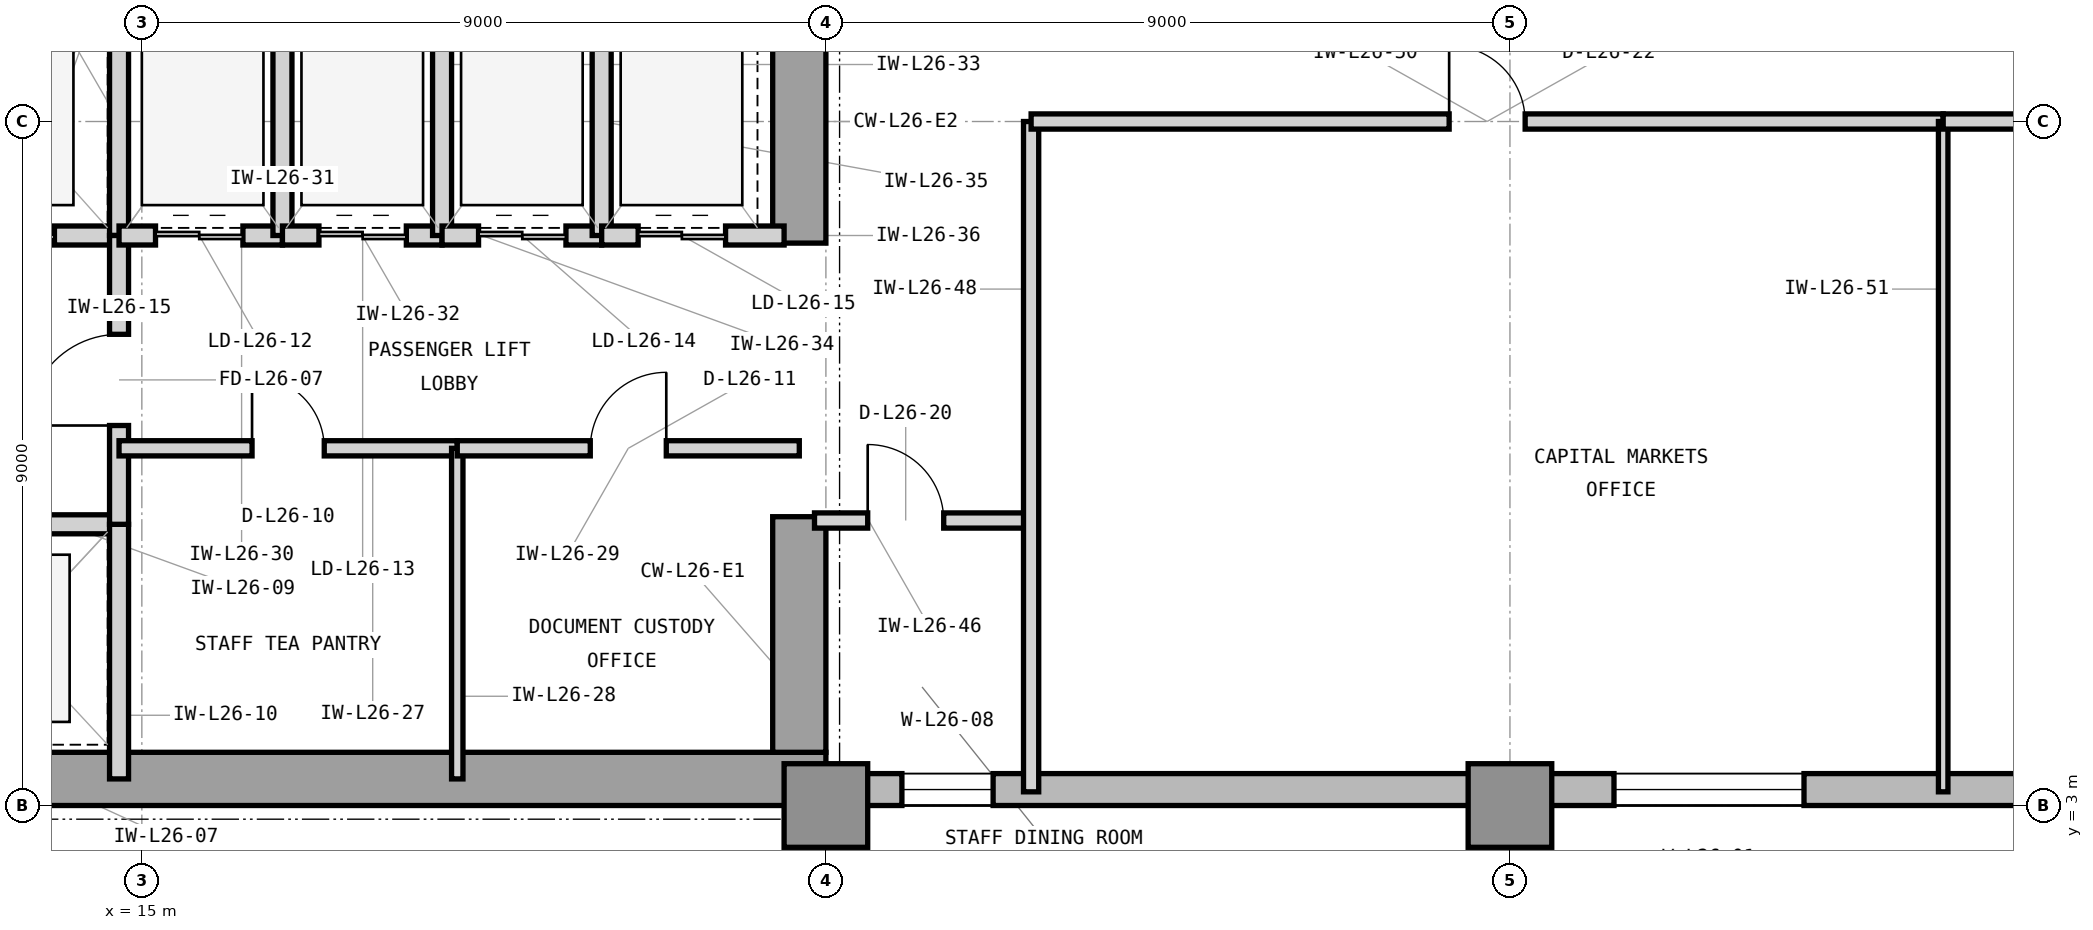
"""IFC4 building model, lengths in metres.
Left out: names, types, materials, properties, quantities, classifications, styles, units other than length and angle.
Written with IfcOpenShell. Run it as: python <this file> out.ifc"""

import sys

from ifc_helpers import new_model, si_unit, direction, frame, frame_2d, origin, origin_2d, place, context, subcontext, project, spatial, rectangle, extrude, element, fill, save


model = new_model("IFC4")
c1 = context("Model", 3, precision=1e-05, world=origin(), true_north=direction((0.0, 1.0)))
c2 = subcontext(c1, "Body", "Model", "MODEL_VIEW")
j1 = project(units=[si_unit("LENGTHUNIT", "METRE"), si_unit("PLANEANGLEUNIT", "RADIAN")], contexts=[c1])
p1 = place(None, origin())
s1 = spatial("IfcSite", under=j1, at=p1, CompositionType="ELEMENT")
p2 = place(p1, origin())
s2 = spatial("IfcBuilding", under=s1, at=p2, CompositionType="ELEMENT")
p3 = place(p2, frame((0.0, 0.0, 112.8)))
s3 = spatial("IfcBuildingStorey", under=s2, at=p3, CompositionType="ELEMENT", Elevation=112.8)
p4 = place(p3, frame((7.475, 3.35, 0.0), z_axis=(0.0, 0.0, 1.0), x_axis=(1.0, 0.0, 0.0)))
e1 = element("IfcWall", 1, at=p4, inside=s3, PredefinedType="SHEAR", context=c2, shape_type="SweptSolid", body=[
    extrude(rectangle(XDim=16.525, YDim=0.7, at=frame_2d((8.262, 0.0))), origin(), (0.0, 0.0, 1.0), 3.9),
])
p5 = place(p3, frame((23.65, 3.7, 0.0), z_axis=(0.0, 0.0, 1.0), x_axis=(0.0, 1.0, 0.0)))
e2 = element("IfcWall", 2, at=p5, inside=s3, PredefinedType="SHEAR", context=c2, shape_type="SweptSolid", body=[
    extrude(rectangle(XDim=3.1, YDim=0.7, at=frame_2d((1.55, 0.0))), origin(), (0.0, 0.0, 1.0), 3.9),
])
p6 = place(p3, frame((23.65, 10.4, 0.0), z_axis=(0.0, 0.0, 1.0), x_axis=(0.0, 1.0, 0.0)))
e3 = element("IfcWall", 3, at=p6, inside=s3, PredefinedType="SHEAR", context=c2, shape_type="SweptSolid", body=[
    extrude(rectangle(XDim=3.2, YDim=0.7, at=frame_2d((1.6, 0.0))), origin(), (0.0, 0.0, 1.0), 3.9),
])
for number, where, z_axis, x_axis in (
    (4, (24.0, 3.0, 0.0), (0.0, 0.0, 1.0), (1.0, 0.0, 0.0)),
    (5, (33.0, 3.0, 0.0), (0.0, 0.0, 1.0), (1.0, 0.0, 0.0)),
):
    element("IfcColumn", number, at=place(p3, frame(where, z_axis=z_axis, x_axis=x_axis)), inside=s3, PredefinedType="COLUMN", context=c2, shape_type="SweptSolid", body=[
        extrude(rectangle(XDim=1.1, YDim=1.1, at=origin_2d()), origin(), (0.0, 0.0, 1.0), 3.9),
    ])
p7 = place(p3, frame((23.9, 3.21, 0.0), z_axis=(0.0, 0.0, 1.0), x_axis=(1.0, 0.0, 0.0)))
e6 = element("IfcWall", 6, at=p7, inside=s3, PredefinedType="STANDARD", context=c2, shape_type="SweptSolid", body=[
    extrude(rectangle(XDim=37.5, YDim=0.42, at=frame_2d((18.75, 0.0))), origin(), (0.0, 0.0, 1.0), 3.7),
])
p8 = place(p7, frame((10.469, 0.0, 0.85)))
e7 = element("IfcOpeningElement", 7, at=p8, cuts=e6, PredefinedType="OPENING", context=c2, shape_type="SweptSolid", body=[
    extrude(rectangle(XDim=2.5, YDim=2.25, at=frame_2d((1.25, 1.125))), frame((0.0, 0.22, 0.0), z_axis=(0.0, -1.0, 0.0), x_axis=(1.0, 0.0, 0.0)), (0.0, 0.0, 1.0), 0.44),
])
p9 = place(p7, frame((19.844, 0.0, 0.85)))
e8 = element("IfcOpeningElement", 8, at=p9, cuts=e6, PredefinedType="OPENING", context=c2, shape_type="SweptSolid", body=[
    extrude(rectangle(XDim=2.5, YDim=2.25, at=frame_2d((1.25, 1.125))), frame((0.0, 0.22, 0.0), z_axis=(0.0, -1.0, 0.0), x_axis=(1.0, 0.0, 0.0)), (0.0, 0.0, 1.0), 0.44),
])
p10 = place(p7, frame((1.1, 0.0, 0.85)))
e9 = element("IfcOpeningElement", 9, at=p10, cuts=e6, PredefinedType="OPENING", context=c2, shape_type="SweptSolid", body=[
    extrude(rectangle(XDim=1.2, YDim=2.25, at=frame_2d((0.6, 1.125))), frame((0.0, 0.22, 0.0), z_axis=(0.0, -1.0, 0.0), x_axis=(1.0, 0.0, 0.0)), (0.0, 0.0, 1.0), 0.44),
])
p11 = place(p7, frame((28.036, 0.0, 0.85)))
e10 = element("IfcOpeningElement", 10, at=p11, cuts=e6, PredefinedType="OPENING", context=c2, shape_type="SweptSolid", body=[
    extrude(rectangle(XDim=1.2, YDim=2.25, at=frame_2d((0.6, 1.125))), frame((0.0, 0.22, 0.0), z_axis=(0.0, -1.0, 0.0), x_axis=(1.0, 0.0, 0.0)), (0.0, 0.0, 1.0), 0.44),
])
p12 = place(p3, frame((11.82, 6.7, 0.0), z_axis=(0.0, 0.0, 1.0), x_axis=(1.0, 0.0, 0.0)))
e11 = element("IfcWall", 11, at=p12, inside=s3, PredefinedType="PARTITIONING", context=c2, shape_type="SweptSolid", body=[
    extrude(rectangle(XDim=2.88, YDim=0.25, at=frame_2d((1.44, 0.0))), origin(), (0.0, 0.0, 1.0), 3.227),
])
p13 = place(p12, frame((0.85, 0.0, 0.0)))
e12 = element("IfcOpeningElement", 12, at=p13, cuts=e11, PredefinedType="OPENING", context=c2, shape_type="SweptSolid", body=[
    extrude(rectangle(XDim=1.1, YDim=2.25, at=frame_2d((0.55, 1.125))), frame((0.0, 0.135, 0.0), z_axis=(0.0, -1.0, 0.0), x_axis=(1.0, 0.0, 0.0)), (0.0, 0.0, 1.0), 0.27),
])
p14 = place(p3, frame((14.7, 3.35, 0.0), z_axis=(0.0, 0.0, 1.0), x_axis=(0.0, 1.0, 0.0)))
e13 = element("IfcWall", 13, at=p14, inside=s3, PredefinedType="PARTITIONING", context=c2, shape_type="SweptSolid", body=[
    extrude(rectangle(XDim=3.35, YDim=0.25, at=frame_2d((1.675, 0.0))), origin(), (0.0, 0.0, 1.0), 3.69),
])
p15 = place(p3, frame((11.95, 10.5, 0.0), z_axis=(0.0, 0.0, 1.0), x_axis=(1.0, 0.0, 0.0)))
e14 = element("IfcWall", 14, at=p15, inside=s3, PredefinedType="PARTITIONING", context=c2, shape_type="SweptSolid", body=[
    extrude(rectangle(XDim=2.75, YDim=0.25, at=frame_2d((1.375, 0.0))), origin(), (0.0, 0.0, 1.0), 3.227),
])
p16 = place(p15, frame((0.8, 0.0, 0.0)))
e15 = element("IfcOpeningElement", 15, at=p16, cuts=e14, PredefinedType="OPENING", context=c2, shape_type="SweptSolid", body=[
    extrude(rectangle(XDim=1.1, YDim=2.25, at=frame_2d((0.55, 1.125))), frame((0.0, 0.135, 0.0), z_axis=(0.0, -1.0, 0.0), x_axis=(1.0, 0.0, 0.0)), (0.0, 0.0, 1.0), 0.27),
])
p17 = place(p3, frame((14.7, 10.5, 0.0), z_axis=(0.0, 0.0, 1.0), x_axis=(0.0, 1.0, 0.0)))
e16 = element("IfcWall", 16, at=p17, inside=s3, PredefinedType="PARTITIONING", context=c2, shape_type="SweptSolid", body=[
    extrude(rectangle(XDim=3.0, YDim=0.25, at=frame_2d((1.5, 0.0))), origin(), (0.0, 0.0, 1.0), 3.69),
])
p18 = place(p3, frame((14.7, 6.7, 0.0), z_axis=(0.0, 0.0, 1.0), x_axis=(0.0, 1.0, 0.0)))
e17 = element("IfcWall", 17, at=p18, inside=s3, PredefinedType="PARTITIONING", context=c2, shape_type="SweptSolid", body=[
    extrude(rectangle(XDim=3.8, YDim=0.25, at=frame_2d((1.9, 0.0))), origin(), (0.0, 0.0, 1.0), 3.69),
])
p19 = place(p18, frame((1.3, 0.0, 0.0)))
e18 = element("IfcOpeningElement", 18, at=p19, cuts=e17, PredefinedType="OPENING", context=c2, shape_type="SweptSolid", body=[
    extrude(rectangle(XDim=1.2, YDim=2.2, at=frame_2d((0.6, 1.1))), frame((0.0, 0.135, 0.0), z_axis=(0.0, -1.0, 0.0), x_axis=(1.0, 0.0, 0.0)), (0.0, 0.0, 1.0), 0.27),
])
p20 = place(p3, frame((14.7, 7.7, 0.0), z_axis=(0.0, 0.0, 1.0), x_axis=(1.0, 0.0, 0.0)))
e19 = element("IfcWall", 19, at=p20, inside=s3, PredefinedType="PARTITIONING", context=c2, shape_type="SweptSolid", body=[
    extrude(rectangle(XDim=4.45, YDim=0.2, at=frame_2d((2.225, 0.0))), origin(), (0.0, 0.0, 1.0), 3.69),
])
p21 = place(p20, frame((1.75, 0.0, 0.0)))
e20 = element("IfcOpeningElement", 20, at=p21, cuts=e19, PredefinedType="OPENING", context=c2, shape_type="SweptSolid", body=[
    extrude(rectangle(XDim=0.95, YDim=2.1, at=frame_2d((0.475, 1.05))), frame((0.0, 0.11, 0.0), z_axis=(0.0, -1.0, 0.0), x_axis=(1.0, 0.0, 0.0)), (0.0, 0.0, 1.0), 0.22),
])
p22 = place(p3, frame((19.15, 3.35, 0.0), z_axis=(0.0, 0.0, 1.0), x_axis=(0.0, 1.0, 0.0)))
e21 = element("IfcWall", 21, at=p22, inside=s3, PredefinedType="PARTITIONING", context=c2, shape_type="SweptSolid", body=[
    extrude(rectangle(XDim=4.35, YDim=0.15, at=frame_2d((2.175, 0.0))), origin(), (0.0, 0.0, 1.0), 3.69),
])
p23 = place(p3, frame((19.15, 7.7, 0.0), z_axis=(0.0, 0.0, 1.0), x_axis=(1.0, 0.0, 0.0)))
e22 = element("IfcWall", 22, at=p23, inside=s3, PredefinedType="PARTITIONING", context=c2, shape_type="SweptSolid", body=[
    extrude(rectangle(XDim=4.5, YDim=0.2, at=frame_2d((2.25, 0.0))), origin(), (0.0, 0.0, 1.0), 3.69),
])
p24 = place(p23, frame((1.75, 0.0, 0.0)))
e23 = element("IfcOpeningElement", 23, at=p24, cuts=e22, PredefinedType="OPENING", context=c2, shape_type="SweptSolid", body=[
    extrude(rectangle(XDim=1.0, YDim=2.15, at=frame_2d((0.5, 1.075))), frame((0.0, 0.11, 0.0), z_axis=(0.0, -1.0, 0.0), x_axis=(1.0, 0.0, 0.0)), (0.0, 0.0, 1.0), 0.22),
])
p25 = place(p3, frame((14.7, 10.5, 0.0), z_axis=(0.0, 0.0, 1.0), x_axis=(1.0, 0.0, 0.0)))
e24 = element("IfcWall", 24, at=p25, inside=s3, PredefinedType="PARTITIONING", context=c2, shape_type="SweptSolid", body=[
    extrude(rectangle(XDim=2.15, YDim=0.25, at=frame_2d((1.075, 0.0))), origin(), (0.0, 0.0, 1.0), 3.227),
])
p26 = place(p25, frame((0.48, 0.0, 0.0)))
e25 = element("IfcOpeningElement", 25, at=p26, cuts=e24, PredefinedType="OPENING", context=c2, shape_type="SweptSolid", body=[
    extrude(rectangle(XDim=1.15, YDim=2.25, at=frame_2d((0.575, 1.125))), frame((0.0, 0.135, 0.0), z_axis=(0.0, -1.0, 0.0), x_axis=(1.0, 0.0, 0.0)), (0.0, 0.0, 1.0), 0.27),
])
p27 = place(p3, frame((16.85, 10.5, 0.0), z_axis=(0.0, 0.0, 1.0), x_axis=(0.0, 1.0, 0.0)))
e26 = element("IfcWall", 26, at=p27, inside=s3, PredefinedType="PARTITIONING", context=c2, shape_type="SweptSolid", body=[
    extrude(rectangle(XDim=3.0, YDim=0.25, at=frame_2d((1.5, 0.0))), origin(), (0.0, 0.0, 1.0), 3.69),
])
p28 = place(p3, frame((16.85, 10.5, 0.0), z_axis=(0.0, 0.0, 1.0), x_axis=(1.0, 0.0, 0.0)))
e27 = element("IfcWall", 27, at=p28, inside=s3, PredefinedType="PARTITIONING", context=c2, shape_type="SweptSolid", body=[
    extrude(rectangle(XDim=2.1, YDim=0.25, at=frame_2d((1.05, 0.0))), origin(), (0.0, 0.0, 1.0), 3.227),
])
p29 = place(p28, frame((0.48, 0.0, 0.0)))
e28 = element("IfcOpeningElement", 28, at=p29, cuts=e27, PredefinedType="OPENING", context=c2, shape_type="SweptSolid", body=[
    extrude(rectangle(XDim=1.15, YDim=2.25, at=frame_2d((0.575, 1.125))), frame((0.0, 0.135, 0.0), z_axis=(0.0, -1.0, 0.0), x_axis=(1.0, 0.0, 0.0)), (0.0, 0.0, 1.0), 0.27),
])
p30 = place(p3, frame((18.95, 10.5, 0.0), z_axis=(0.0, 0.0, 1.0), x_axis=(0.0, 1.0, 0.0)))
e29 = element("IfcWall", 29, at=p30, inside=s3, PredefinedType="PARTITIONING", context=c2, shape_type="SweptSolid", body=[
    extrude(rectangle(XDim=3.0, YDim=0.25, at=frame_2d((1.5, 0.0))), origin(), (0.0, 0.0, 1.0), 3.69),
])
p31 = place(p3, frame((18.95, 10.5, 0.0), z_axis=(0.0, 0.0, 1.0), x_axis=(1.0, 0.0, 0.0)))
e30 = element("IfcWall", 30, at=p31, inside=s3, PredefinedType="PARTITIONING", context=c2, shape_type="SweptSolid", body=[
    extrude(rectangle(XDim=2.1, YDim=0.25, at=frame_2d((1.05, 0.0))), origin(), (0.0, 0.0, 1.0), 3.227),
])
p32 = place(p31, frame((0.48, 0.0, 0.0)))
e31 = element("IfcOpeningElement", 31, at=p32, cuts=e30, PredefinedType="OPENING", context=c2, shape_type="SweptSolid", body=[
    extrude(rectangle(XDim=1.15, YDim=2.25, at=frame_2d((0.575, 1.125))), frame((0.0, 0.135, 0.0), z_axis=(0.0, -1.0, 0.0), x_axis=(1.0, 0.0, 0.0)), (0.0, 0.0, 1.0), 0.27),
])
p33 = place(p3, frame((21.05, 10.5, 0.0), z_axis=(0.0, 0.0, 1.0), x_axis=(0.0, 1.0, 0.0)))
e32 = element("IfcWall", 32, at=p33, inside=s3, PredefinedType="PARTITIONING", context=c2, shape_type="SweptSolid", body=[
    extrude(rectangle(XDim=3.0, YDim=0.25, at=frame_2d((1.5, 0.0))), origin(), (0.0, 0.0, 1.0), 3.69),
])
p34 = place(p3, frame((21.05, 10.5, 0.0), z_axis=(0.0, 0.0, 1.0), x_axis=(1.0, 0.0, 0.0)))
e33 = element("IfcWall", 33, at=p34, inside=s3, PredefinedType="PARTITIONING", context=c2, shape_type="SweptSolid", body=[
    extrude(rectangle(XDim=2.4, YDim=0.25, at=frame_2d((1.2, 0.0))), origin(), (0.0, 0.0, 1.0), 3.227),
])
p35 = place(p34, frame((0.48, 0.0, 0.0)))
e34 = element("IfcOpeningElement", 34, at=p35, cuts=e33, PredefinedType="OPENING", context=c2, shape_type="SweptSolid", body=[
    extrude(rectangle(XDim=1.15, YDim=2.25, at=frame_2d((0.575, 1.125))), frame((0.0, 0.135, 0.0), z_axis=(0.0, -1.0, 0.0), x_axis=(1.0, 0.0, 0.0)), (0.0, 0.0, 1.0), 0.27),
])
p36 = place(p3, frame((23.85, 6.75, 0.0), z_axis=(0.0, 0.0, 1.0), x_axis=(1.0, 0.0, 0.0)))
e35 = element("IfcWall", 35, at=p36, inside=s3, PredefinedType="PARTITIONING", context=c2, shape_type="SweptSolid", body=[
    extrude(rectangle(XDim=2.85, YDim=0.2, at=frame_2d((1.425, 0.0))), origin(), (0.0, 0.0, 1.0), 3.69),
])
p37 = place(p36, frame((0.7, 0.0, 0.0)))
e36 = element("IfcOpeningElement", 36, at=p37, cuts=e35, PredefinedType="OPENING", context=c2, shape_type="SweptSolid", body=[
    extrude(rectangle(XDim=1.0, YDim=2.15, at=frame_2d((0.5, 1.075))), frame((0.0, 0.11, 0.0), z_axis=(0.0, -1.0, 0.0), x_axis=(1.0, 0.0, 0.0)), (0.0, 0.0, 1.0), 0.22),
])
p38 = place(p3, frame((26.7, 3.18, 0.0), z_axis=(0.0, 0.0, 1.0), x_axis=(0.0, 1.0, 0.0)))
e37 = element("IfcWall", 37, at=p38, inside=s3, PredefinedType="PARTITIONING", context=c2, shape_type="SweptSolid", body=[
    extrude(rectangle(XDim=8.82, YDim=0.2, at=frame_2d((4.41, 0.0))), origin(), (0.0, 0.0, 1.0), 3.69),
])
p39 = place(p3, frame((26.7, 12.0, 0.0), z_axis=(0.0, 0.0, 1.0), x_axis=(1.0, 0.0, 0.0)))
e38 = element("IfcWall", 38, at=p39, inside=s3, PredefinedType="PARTITIONING", context=c2, shape_type="SweptSolid", body=[
    extrude(rectangle(XDim=12.0, YDim=0.2, at=frame_2d((6.0, 0.0))), origin(), (0.0, 0.0, 1.0), 3.227),
])
p40 = place(p39, frame((5.5, 0.0, 0.0)))
e39 = element("IfcOpeningElement", 39, at=p40, cuts=e38, PredefinedType="OPENING", context=c2, shape_type="SweptSolid", body=[
    extrude(rectangle(XDim=1.0, YDim=2.15, at=frame_2d((0.5, 1.075))), frame((0.0, 0.11, 0.0), z_axis=(0.0, -1.0, 0.0), x_axis=(1.0, 0.0, 0.0)), (0.0, 0.0, 1.0), 0.22),
])
p41 = place(p3, frame((38.7, 3.18, 0.0), z_axis=(0.0, 0.0, 1.0), x_axis=(0.0, 1.0, 0.0)))
e40 = element("IfcWall", 40, at=p41, inside=s3, PredefinedType="PARTITIONING", context=c2, shape_type="SweptSolid", body=[
    extrude(rectangle(XDim=8.82, YDim=0.125, at=frame_2d((4.41, 0.0))), origin(), (0.0, 0.0, 1.0), 3.69),
])
p42 = place(p3, frame((38.7, 12.0, 0.0), z_axis=(0.0, 0.0, 1.0), x_axis=(1.0, 0.0, 0.0)))
e41 = element("IfcWall", 41, at=p42, inside=s3, PredefinedType="PARTITIONING", context=c2, shape_type="SweptSolid", body=[
    extrude(rectangle(XDim=10.5, YDim=0.2, at=frame_2d((5.25, 0.0))), origin(), (0.0, 0.0, 1.0), 3.227),
])
p43 = place(p42, frame((4.75, 0.0, 0.0)))
e42 = element("IfcOpeningElement", 42, at=p43, cuts=e41, PredefinedType="OPENING", context=c2, shape_type="SweptSolid", body=[
    extrude(rectangle(XDim=1.0, YDim=2.15, at=frame_2d((0.5, 1.075))), frame((0.0, 0.11, 0.0), z_axis=(0.0, -1.0, 0.0), x_axis=(1.0, 0.0, 0.0)), (0.0, 0.0, 1.0), 0.22),
])
p44 = place(p8, origin())
e43 = element("IfcWindow", 43, at=p44, inside=s3, PartitioningType="SINGLE_PANEL", PredefinedType="WINDOW", context=c2, shape_type="SweptSolid", body=[
    extrude(rectangle(XDim=2.5, YDim=2.25, at=frame_2d((1.25, 1.125))), frame((0.0, 0.11, 0.0), z_axis=(0.0, -1.0, 0.0), x_axis=(1.0, 0.0, 0.0)), (0.0, 0.0, 1.0), 0.06),
])
fill(e7, e43)
p45 = place(p16, origin())
e44 = element("IfcDoor", 44, at=p45, inside=s3, OperationType="DOUBLE_DOOR_SLIDING", PredefinedType="DOOR", context=c2, shape_type="SweptSolid", body=[
    extrude(rectangle(XDim=1.1, YDim=2.25, at=frame_2d((0.55, 1.125))), frame((0.0, 0.025, 0.0), z_axis=(0.0, -1.0, 0.0), x_axis=(1.0, 0.0, 0.0)), (0.0, 0.0, 1.0), 0.05),
])
fill(e15, e44)
p46 = place(p19, origin())
e45 = element("IfcDoor", 45, at=p46, inside=s3, OperationType="SINGLE_SWING_LEFT", PredefinedType="DOOR", context=c2, shape_type="SweptSolid", body=[
    extrude(rectangle(XDim=1.2, YDim=2.2, at=frame_2d((0.6, 1.1))), frame((0.0, 0.025, 0.0), z_axis=(0.0, -1.0, 0.0), x_axis=(1.0, 0.0, 0.0)), (0.0, 0.0, 1.0), 0.05),
])
fill(e18, e45)
p47 = place(p21, origin())
e46 = element("IfcDoor", 46, at=p47, inside=s3, OperationType="SINGLE_SWING_LEFT", PredefinedType="DOOR", context=c2, shape_type="SweptSolid", body=[
    extrude(rectangle(XDim=0.95, YDim=2.1, at=frame_2d((0.475, 1.05))), frame((0.0, 0.025, 0.0), z_axis=(0.0, -1.0, 0.0), x_axis=(1.0, 0.0, 0.0)), (0.0, 0.0, 1.0), 0.05),
])
fill(e20, e46)
p48 = place(p24, origin())
e47 = element("IfcDoor", 47, at=p48, inside=s3, OperationType="SINGLE_SWING_RIGHT", PredefinedType="DOOR", context=c2, shape_type="SweptSolid", body=[
    extrude(rectangle(XDim=1.0, YDim=2.15, at=frame_2d((0.5, 1.075))), frame((0.0, 0.025, 0.0), z_axis=(0.0, -1.0, 0.0), x_axis=(1.0, 0.0, 0.0)), (0.0, 0.0, 1.0), 0.05),
])
fill(e23, e47)
p49 = place(p26, origin())
e48 = element("IfcDoor", 48, at=p49, inside=s3, OperationType="DOUBLE_DOOR_SLIDING", PredefinedType="DOOR", context=c2, shape_type="SweptSolid", body=[
    extrude(rectangle(XDim=1.15, YDim=2.25, at=frame_2d((0.575, 1.125))), frame((0.0, 0.025, 0.0), z_axis=(0.0, -1.0, 0.0), x_axis=(1.0, 0.0, 0.0)), (0.0, 0.0, 1.0), 0.05),
])
fill(e25, e48)
p50 = place(p29, origin())
e49 = element("IfcDoor", 49, at=p50, inside=s3, OperationType="DOUBLE_DOOR_SLIDING", PredefinedType="DOOR", context=c2, shape_type="SweptSolid", body=[
    extrude(rectangle(XDim=1.15, YDim=2.25, at=frame_2d((0.575, 1.125))), frame((0.0, 0.025, 0.0), z_axis=(0.0, -1.0, 0.0), x_axis=(1.0, 0.0, 0.0)), (0.0, 0.0, 1.0), 0.05),
])
fill(e28, e49)
p51 = place(p32, origin())
e50 = element("IfcDoor", 50, at=p51, inside=s3, OperationType="DOUBLE_DOOR_SLIDING", PredefinedType="DOOR", context=c2, shape_type="SweptSolid", body=[
    extrude(rectangle(XDim=1.15, YDim=2.25, at=frame_2d((0.575, 1.125))), frame((0.0, 0.025, 0.0), z_axis=(0.0, -1.0, 0.0), x_axis=(1.0, 0.0, 0.0)), (0.0, 0.0, 1.0), 0.05),
])
fill(e31, e50)
p52 = place(p35, origin())
e51 = element("IfcDoor", 51, at=p52, inside=s3, OperationType="DOUBLE_DOOR_SLIDING", PredefinedType="DOOR", context=c2, shape_type="SweptSolid", body=[
    extrude(rectangle(XDim=1.15, YDim=2.25, at=frame_2d((0.575, 1.125))), frame((0.0, 0.025, 0.0), z_axis=(0.0, -1.0, 0.0), x_axis=(1.0, 0.0, 0.0)), (0.0, 0.0, 1.0), 0.05),
])
fill(e34, e51)
p53 = place(p37, origin())
e52 = element("IfcDoor", 52, at=p53, inside=s3, OperationType="SINGLE_SWING_LEFT", PredefinedType="DOOR", context=c2, shape_type="SweptSolid", body=[
    extrude(rectangle(XDim=1.0, YDim=2.15, at=frame_2d((0.5, 1.075))), frame((0.0, 0.025, 0.0), z_axis=(0.0, -1.0, 0.0), x_axis=(1.0, 0.0, 0.0)), (0.0, 0.0, 1.0), 0.05),
])
fill(e36, e52)
p54 = place(p40, origin())
e53 = element("IfcDoor", 53, at=p54, inside=s3, OperationType="SINGLE_SWING_LEFT", PredefinedType="DOOR", context=c2, shape_type="SweptSolid", body=[
    extrude(rectangle(XDim=1.0, YDim=2.15, at=frame_2d((0.5, 1.075))), frame((0.0, 0.025, 0.0), z_axis=(0.0, -1.0, 0.0), x_axis=(1.0, 0.0, 0.0)), (0.0, 0.0, 1.0), 0.05),
])
fill(e39, e53)
p55 = place(p10, origin())
e54 = element("IfcWindow", 54, at=p55, inside=s3, PartitioningType="SINGLE_PANEL", PredefinedType="WINDOW", context=c2, shape_type="SweptSolid", body=[
    extrude(rectangle(XDim=1.2, YDim=2.25, at=frame_2d((0.6, 1.125))), frame((0.0, 0.11, 0.0), z_axis=(0.0, -1.0, 0.0), x_axis=(1.0, 0.0, 0.0)), (0.0, 0.0, 1.0), 0.06),
])
fill(e9, e54)
save(model, sys.argv[1])
